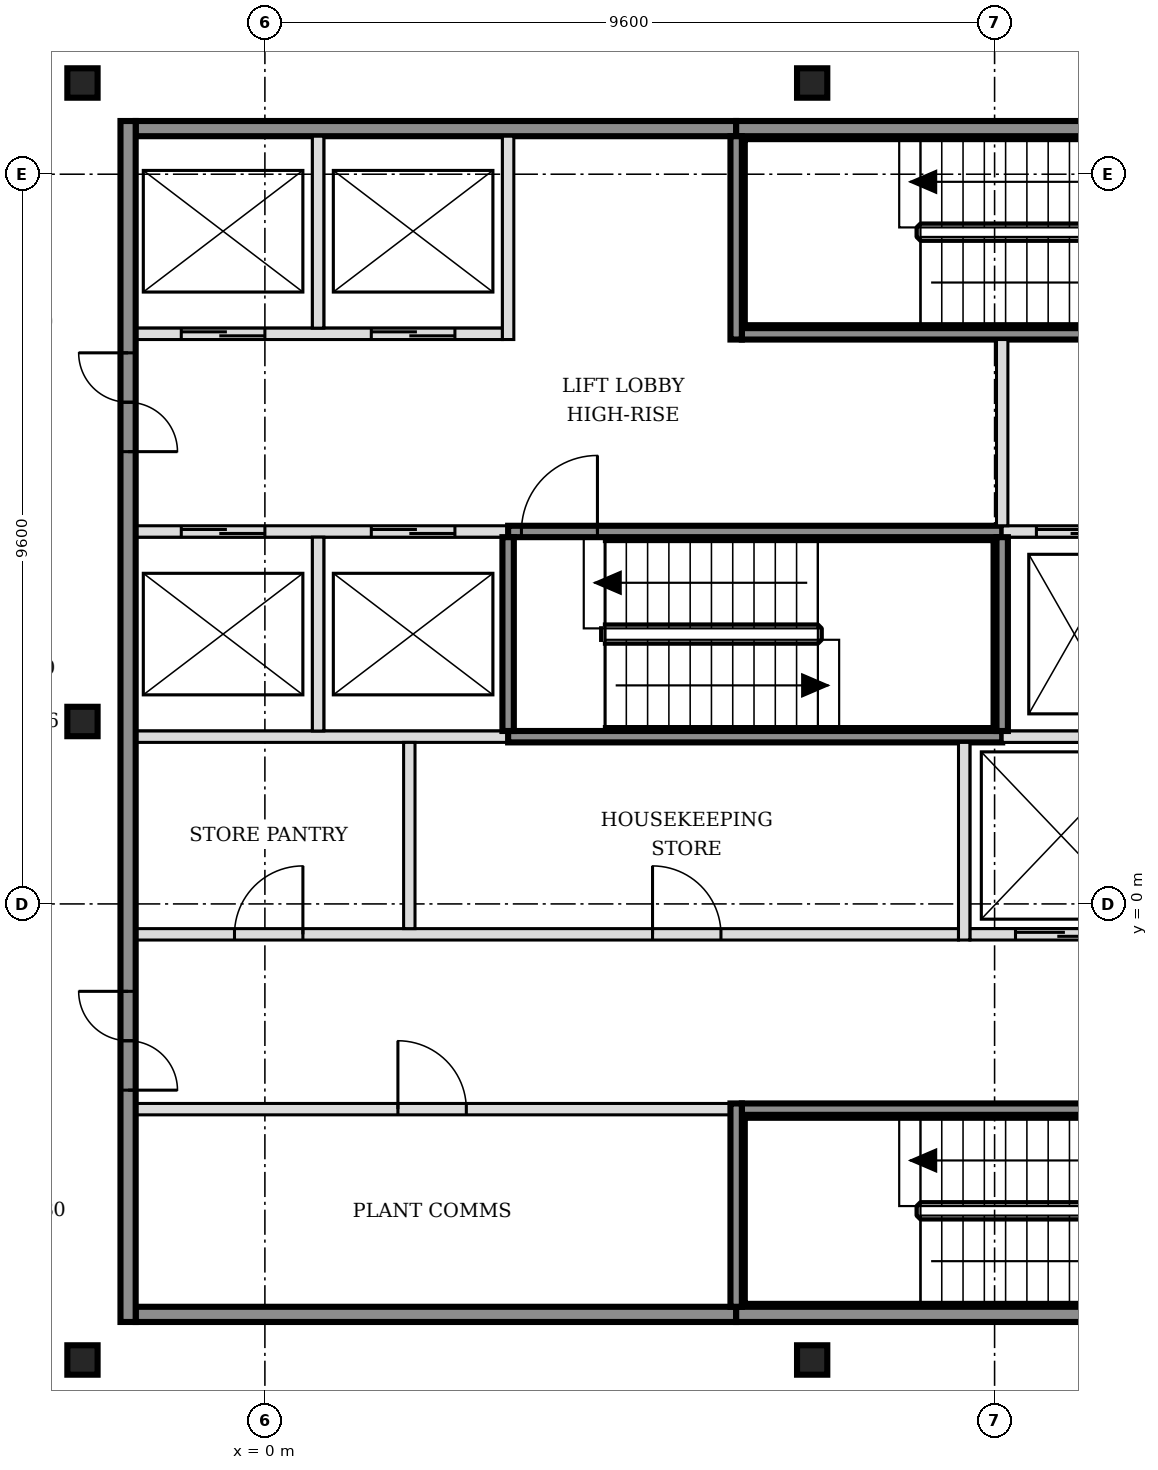
"""IFC4 building model, lengths in metres.
Left out: names, types, materials, properties, quantities, classifications, styles, units other than length and angle.
Written with IfcOpenShell. Run it as: python <this file> out.ifc"""

import sys

from ifc_helpers import new_model, si_unit, direction, frame, frame_2d, origin, origin_2d, place, context, subcontext, project, spatial, rectangle, i_section, extrude, element, fill, save


model = new_model("IFC4")
c1 = context("Model", 3, precision=1e-05, world=origin(), true_north=direction((0.0, 1.0)))
c2 = subcontext(c1, "Body", "Model", "MODEL_VIEW")
j1 = project(units=[si_unit("LENGTHUNIT", "METRE"), si_unit("PLANEANGLEUNIT", "RADIAN")], contexts=[c1])
p1 = place(None, origin())
s1 = spatial("IfcSite", under=j1, at=p1, CompositionType="ELEMENT")
p2 = place(p1, origin())
s2 = spatial("IfcBuilding", under=s1, at=p2, CompositionType="ELEMENT")
p3 = place(p2, frame((0.0, 0.0, 243.0)))
s3 = spatial("IfcBuildingStorey", under=s2, at=p3, CompositionType="ELEMENT", Elevation=243.0)
for number, where, z_axis, x_axis in (
    (1, (-2.4, -6.0, -0.15), (0.0, 0.0, 1.0), (1.0, 0.0, 0.0)),
    (2, (7.2, -6.0, -0.15), (0.0, 0.0, 1.0), (1.0, 0.0, 0.0)),
    (3, (-2.4, 2.4, -0.15), (0.0, 0.0, 1.0), (1.0, 0.0, 0.0)),
    (4, (-2.4, 10.8, -0.15), (0.0, 0.0, 1.0), (1.0, 0.0, 0.0)),
    (5, (7.2, 10.8, -0.15), (0.0, 0.0, 1.0), (1.0, 0.0, 0.0)),
):
    element("IfcColumn", number, at=place(p3, frame(where, z_axis=z_axis, x_axis=x_axis)), inside=s3, PredefinedType="COLUMN", context=c2, shape_type="SweptSolid", body=[
        extrude(i_section(OverallWidth=0.398, OverallDepth=0.387, WebThickness=0.021, FlangeThickness=0.033, FilletRadius=0.015, at=origin_2d()), origin(), (0.0, 0.0, 1.0), 3.6),
    ])
p4 = place(p3, frame((-1.7, -5.4, 0.0), z_axis=(0.0, 0.0, 1.0), x_axis=(1.0, 0.0, 0.0)))
e6 = element("IfcWall", 6, at=p4, inside=s3, PredefinedType="SOLIDWALL", context=c2, shape_type="SweptSolid", body=[
    extrude(rectangle(XDim=7.9, YDim=0.2, at=frame_2d((3.95, 0.0))), origin(), (0.0, 0.0, 1.0), 3.45),
])
p5 = place(p3, frame((6.2, -5.4, 0.0), z_axis=(0.0, 0.0, 1.0), x_axis=(1.0, 0.0, 0.0)))
e7 = element("IfcWall", 7, at=p5, inside=s3, PredefinedType="SOLIDWALL", context=c2, shape_type="SweptSolid", body=[
    extrude(rectangle(XDim=6.5, YDim=0.2, at=frame_2d((3.25, 0.0))), origin(), (0.0, 0.0, 1.0), 3.45),
])
p6 = place(p3, frame((-1.7, -2.7, 0.0), z_axis=(0.0, 0.0, 1.0), x_axis=(1.0, 0.0, 0.0)))
e8 = element("IfcWall", 8, at=p6, inside=s3, PredefinedType="PARTITIONING", context=c2, shape_type="SweptSolid", body=[
    extrude(rectangle(XDim=7.825, YDim=0.15, at=frame_2d((3.913, 0.0))), origin(), (0.0, 0.0, 1.0), 3.45),
])
p7 = place(p6, frame((3.45, 0.0, 0.0)))
e9 = element("IfcOpeningElement", 9, at=p7, cuts=e8, PredefinedType="OPENING", context=c2, shape_type="SweptSolid", body=[
    extrude(rectangle(XDim=0.9, YDim=2.1, at=frame_2d((0.45, 1.05))), frame((0.0, 0.085, 0.0), z_axis=(0.0, -1.0, 0.0), x_axis=(1.0, 0.0, 0.0)), (0.0, 0.0, 1.0), 0.17),
])
p8 = place(p3, frame((6.275, -2.7, 0.0), z_axis=(0.0, 0.0, 1.0), x_axis=(1.0, 0.0, 0.0)))
e10 = element("IfcWall", 10, at=p8, inside=s3, PredefinedType="SOLIDWALL", context=c2, shape_type="SweptSolid", body=[
    extrude(rectangle(XDim=6.35, YDim=0.15, at=frame_2d((3.175, 0.0))), origin(), (0.0, 0.0, 1.0), 3.45),
])
p9 = place(p8, frame((5.225, 0.0, 0.0)))
e11 = element("IfcOpeningElement", 11, at=p9, cuts=e10, PredefinedType="OPENING", context=c2, shape_type="SweptSolid", body=[
    extrude(rectangle(XDim=1.0, YDim=2.1, at=frame_2d((0.5, 1.05))), frame((0.0, 0.085, 0.0), z_axis=(0.0, -1.0, 0.0), x_axis=(1.0, 0.0, 0.0)), (0.0, 0.0, 1.0), 0.17),
])
p10 = place(p3, frame((-1.7, -0.4, 0.0), z_axis=(0.0, 0.0, 1.0), x_axis=(1.0, 0.0, 0.0)))
e12 = element("IfcWall", 12, at=p10, inside=s3, PredefinedType="PARTITIONING", context=c2, shape_type="SweptSolid", body=[
    extrude(rectangle(XDim=10.825, YDim=0.15, at=frame_2d((5.413, 0.0))), origin(), (0.0, 0.0, 1.0), 3.45),
])
p11 = place(p10, frame((1.3, 0.0, 0.0)))
e13 = element("IfcOpeningElement", 13, at=p11, cuts=e12, PredefinedType="OPENING", context=c2, shape_type="SweptSolid", body=[
    extrude(rectangle(XDim=0.9, YDim=2.1, at=frame_2d((0.45, 1.05))), frame((0.0, 0.085, 0.0), z_axis=(0.0, -1.0, 0.0), x_axis=(1.0, 0.0, 0.0)), (0.0, 0.0, 1.0), 0.17),
])
p12 = place(p10, frame((6.8, 0.0, 0.0)))
e14 = element("IfcOpeningElement", 14, at=p12, cuts=e12, PredefinedType="OPENING", context=c2, shape_type="SweptSolid", body=[
    extrude(rectangle(XDim=0.9, YDim=2.1, at=frame_2d((0.45, 1.05))), frame((0.0, 0.085, 0.0), z_axis=(0.0, -1.0, 0.0), x_axis=(1.0, 0.0, 0.0)), (0.0, 0.0, 1.0), 0.17),
])
p13 = place(p3, frame((9.275, -0.4, 0.0), z_axis=(0.0, 0.0, 1.0), x_axis=(1.0, 0.0, 0.0)))
e15 = element("IfcWall", 15, at=p13, inside=s3, PredefinedType="SOLIDWALL", context=c2, shape_type="SweptSolid", body=[
    extrude(rectangle(XDim=4.95, YDim=0.15, at=frame_2d((2.475, 0.0))), origin(), (0.0, 0.0, 1.0), 3.45),
])
p14 = place(p13, frame((0.6, 0.0, 0.0)))
e16 = element("IfcOpeningElement", 16, at=p14, cuts=e15, PredefinedType="OPENING", context=c2, shape_type="SweptSolid", body=[
    extrude(rectangle(XDim=1.2, YDim=2.1, at=frame_2d((0.6, 1.05))), frame((0.0, 0.085, 0.0), z_axis=(0.0, -1.0, 0.0), x_axis=(1.0, 0.0, 0.0)), (0.0, 0.0, 1.0), 0.17),
])
p15 = place(p13, frame((3.15, 0.0, 0.0)))
e17 = element("IfcOpeningElement", 17, at=p15, cuts=e15, PredefinedType="OPENING", context=c2, shape_type="SweptSolid", body=[
    extrude(rectangle(XDim=1.2, YDim=2.1, at=frame_2d((0.6, 1.05))), frame((0.0, 0.085, 0.0), z_axis=(0.0, -1.0, 0.0), x_axis=(1.0, 0.0, 0.0)), (0.0, 0.0, 1.0), 0.17),
])
p16 = place(p3, frame((-1.7, 2.2, 0.0), z_axis=(0.0, 0.0, 1.0), x_axis=(1.0, 0.0, 0.0)))
e18 = element("IfcWall", 18, at=p16, inside=s3, PredefinedType="SOLIDWALL", context=c2, shape_type="SweptSolid", body=[
    extrude(rectangle(XDim=4.9, YDim=0.15, at=frame_2d((2.45, 0.0))), origin(), (0.0, 0.0, 1.0), 3.45),
])
p17 = place(p3, frame((3.2, 2.2, 0.0), z_axis=(0.0, 0.0, 1.0), x_axis=(1.0, 0.0, 0.0)))
e19 = element("IfcWall", 19, at=p17, inside=s3, PredefinedType="SOLIDWALL", context=c2, shape_type="SweptSolid", body=[
    extrude(rectangle(XDim=6.5, YDim=0.15, at=frame_2d((3.25, 0.0))), origin(), (0.0, 0.0, 1.0), 3.45),
])
p18 = place(p3, frame((9.7, 2.2, 0.0), z_axis=(0.0, 0.0, 1.0), x_axis=(1.0, 0.0, 0.0)))
e20 = element("IfcWall", 20, at=p18, inside=s3, PredefinedType="SOLIDWALL", context=c2, shape_type="SweptSolid", body=[
    extrude(rectangle(XDim=4.525, YDim=0.15, at=frame_2d((2.263, 0.0))), origin(), (0.0, 0.0, 1.0), 3.45),
])
p19 = place(p3, frame((-1.7, 4.9, 0.0), z_axis=(0.0, 0.0, 1.0), x_axis=(1.0, 0.0, 0.0)))
e21 = element("IfcWall", 21, at=p19, inside=s3, PredefinedType="SOLIDWALL", context=c2, shape_type="SweptSolid", body=[
    extrude(rectangle(XDim=4.9, YDim=0.15, at=frame_2d((2.45, 0.0))), origin(), (0.0, 0.0, 1.0), 3.45),
])
p20 = place(p19, frame((0.6, 0.0, 0.0)))
e22 = element("IfcOpeningElement", 22, at=p20, cuts=e21, PredefinedType="OPENING", context=c2, shape_type="SweptSolid", body=[
    extrude(rectangle(XDim=1.1, YDim=2.1, at=frame_2d((0.55, 1.05))), frame((0.0, 0.085, 0.0), z_axis=(0.0, -1.0, 0.0), x_axis=(1.0, 0.0, 0.0)), (0.0, 0.0, 1.0), 0.17),
])
p21 = place(p19, frame((3.1, 0.0, 0.0)))
e23 = element("IfcOpeningElement", 23, at=p21, cuts=e21, PredefinedType="OPENING", context=c2, shape_type="SweptSolid", body=[
    extrude(rectangle(XDim=1.1, YDim=2.1, at=frame_2d((0.55, 1.05))), frame((0.0, 0.085, 0.0), z_axis=(0.0, -1.0, 0.0), x_axis=(1.0, 0.0, 0.0)), (0.0, 0.0, 1.0), 0.17),
])
p22 = place(p3, frame((3.2, 4.9, 0.0), z_axis=(0.0, 0.0, 1.0), x_axis=(1.0, 0.0, 0.0)))
e24 = element("IfcWall", 24, at=p22, inside=s3, PredefinedType="SOLIDWALL", context=c2, shape_type="SweptSolid", body=[
    extrude(rectangle(XDim=6.5, YDim=0.15, at=frame_2d((3.25, 0.0))), origin(), (0.0, 0.0, 1.0), 3.45),
])
p23 = place(p22, frame((0.175, 0.0, 0.0)))
e25 = element("IfcOpeningElement", 25, at=p23, cuts=e24, PredefinedType="OPENING", context=c2, shape_type="SweptSolid", body=[
    extrude(rectangle(XDim=1.0, YDim=2.1, at=frame_2d((0.5, 1.05))), frame((0.0, 0.085, 0.0), z_axis=(0.0, -1.0, 0.0), x_axis=(1.0, 0.0, 0.0)), (0.0, 0.0, 1.0), 0.17),
])
p24 = place(p3, frame((9.7, 4.9, 0.0), z_axis=(0.0, 0.0, 1.0), x_axis=(1.0, 0.0, 0.0)))
e26 = element("IfcWall", 26, at=p24, inside=s3, PredefinedType="SOLIDWALL", context=c2, shape_type="SweptSolid", body=[
    extrude(rectangle(XDim=6.4, YDim=0.15, at=frame_2d((3.2, 0.0))), origin(), (0.0, 0.0, 1.0), 3.45),
])
p25 = place(p24, frame((0.45, 0.0, 0.0)))
e27 = element("IfcOpeningElement", 27, at=p25, cuts=e26, PredefinedType="OPENING", context=c2, shape_type="SweptSolid", body=[
    extrude(rectangle(XDim=1.0, YDim=2.1, at=frame_2d((0.5, 1.05))), frame((0.0, 0.085, 0.0), z_axis=(0.0, -1.0, 0.0), x_axis=(1.0, 0.0, 0.0)), (0.0, 0.0, 1.0), 0.17),
])
p26 = place(p24, frame((2.35, 0.0, 0.0)))
e28 = element("IfcOpeningElement", 28, at=p26, cuts=e26, PredefinedType="OPENING", context=c2, shape_type="SweptSolid", body=[
    extrude(rectangle(XDim=1.0, YDim=2.1, at=frame_2d((0.5, 1.05))), frame((0.0, 0.085, 0.0), z_axis=(0.0, -1.0, 0.0), x_axis=(1.0, 0.0, 0.0)), (0.0, 0.0, 1.0), 0.17),
])
p27 = place(p24, frame((4.7, 0.0, 0.0)))
e29 = element("IfcOpeningElement", 29, at=p27, cuts=e26, PredefinedType="OPENING", context=c2, shape_type="SweptSolid", body=[
    extrude(rectangle(XDim=0.9, YDim=2.1, at=frame_2d((0.45, 1.05))), frame((0.0, 0.085, 0.0), z_axis=(0.0, -1.0, 0.0), x_axis=(1.0, 0.0, 0.0)), (0.0, 0.0, 1.0), 0.17),
])
p28 = place(p3, frame((-1.7, 7.5, 0.0), z_axis=(0.0, 0.0, 1.0), x_axis=(1.0, 0.0, 0.0)))
e30 = element("IfcWall", 30, at=p28, inside=s3, PredefinedType="SOLIDWALL", context=c2, shape_type="SweptSolid", body=[
    extrude(rectangle(XDim=4.825, YDim=0.15, at=frame_2d((2.413, 0.0))), origin(), (0.0, 0.0, 1.0), 3.45),
])
p29 = place(p28, frame((0.6, 0.0, 0.0)))
e31 = element("IfcOpeningElement", 31, at=p29, cuts=e30, PredefinedType="OPENING", context=c2, shape_type="SweptSolid", body=[
    extrude(rectangle(XDim=1.1, YDim=2.1, at=frame_2d((0.55, 1.05))), frame((0.0, 0.085, 0.0), z_axis=(0.0, -1.0, 0.0), x_axis=(1.0, 0.0, 0.0)), (0.0, 0.0, 1.0), 0.17),
])
p30 = place(p28, frame((3.1, 0.0, 0.0)))
e32 = element("IfcOpeningElement", 32, at=p30, cuts=e30, PredefinedType="OPENING", context=c2, shape_type="SweptSolid", body=[
    extrude(rectangle(XDim=1.1, YDim=2.1, at=frame_2d((0.55, 1.05))), frame((0.0, 0.085, 0.0), z_axis=(0.0, -1.0, 0.0), x_axis=(1.0, 0.0, 0.0)), (0.0, 0.0, 1.0), 0.17),
])
p31 = place(p3, frame((6.275, 7.5, 0.0), z_axis=(0.0, 0.0, 1.0), x_axis=(1.0, 0.0, 0.0)))
e33 = element("IfcWall", 33, at=p31, inside=s3, PredefinedType="SOLIDWALL", context=c2, shape_type="SweptSolid", body=[
    extrude(rectangle(XDim=6.425, YDim=0.15, at=frame_2d((3.212, 0.0))), origin(), (0.0, 0.0, 1.0), 3.45),
])
p32 = place(p31, frame((5.225, 0.0, 0.0)))
e34 = element("IfcOpeningElement", 34, at=p32, cuts=e33, PredefinedType="OPENING", context=c2, shape_type="SweptSolid", body=[
    extrude(rectangle(XDim=1.0, YDim=2.1, at=frame_2d((0.5, 1.05))), frame((0.0, 0.085, 0.0), z_axis=(0.0, -1.0, 0.0), x_axis=(1.0, 0.0, 0.0)), (0.0, 0.0, 1.0), 0.17),
])
p33 = place(p3, frame((-1.7, 10.2, 0.0), z_axis=(0.0, 0.0, 1.0), x_axis=(1.0, 0.0, 0.0)))
e35 = element("IfcWall", 35, at=p33, inside=s3, PredefinedType="SOLIDWALL", context=c2, shape_type="SweptSolid", body=[
    extrude(rectangle(XDim=7.9, YDim=0.2, at=frame_2d((3.95, 0.0))), origin(), (0.0, 0.0, 1.0), 3.45),
])
p34 = place(p3, frame((6.2, 10.2, 0.0), z_axis=(0.0, 0.0, 1.0), x_axis=(1.0, 0.0, 0.0)))
e36 = element("IfcWall", 36, at=p34, inside=s3, PredefinedType="SOLIDWALL", context=c2, shape_type="SweptSolid", body=[
    extrude(rectangle(XDim=6.5, YDim=0.2, at=frame_2d((3.25, 0.0))), origin(), (0.0, 0.0, 1.0), 3.45),
])
p35 = place(p3, frame((-1.8, -5.5, 0.0), z_axis=(0.0, 0.0, 1.0), x_axis=(0.0, 1.0, 0.0)))
e37 = element("IfcWall", 37, at=p35, inside=s3, PredefinedType="SOLIDWALL", context=c2, shape_type="SweptSolid", body=[
    extrude(rectangle(XDim=15.8, YDim=0.2, at=frame_2d((7.9, 0.0))), origin(), (0.0, 0.0, 1.0), 3.45),
])
p36 = place(p35, frame((3.05, 0.0, 0.0)))
e38 = element("IfcOpeningElement", 38, at=p36, cuts=e37, PredefinedType="OPENING", context=c2, shape_type="SweptSolid", body=[
    extrude(rectangle(XDim=1.3, YDim=2.1, at=frame_2d((0.65, 1.05))), frame((0.0, 0.11, 0.0), z_axis=(0.0, -1.0, 0.0), x_axis=(1.0, 0.0, 0.0)), (0.0, 0.0, 1.0), 0.22),
])
p37 = place(p35, frame((11.45, 0.0, 0.0)))
e39 = element("IfcOpeningElement", 39, at=p37, cuts=e37, PredefinedType="OPENING", context=c2, shape_type="SweptSolid", body=[
    extrude(rectangle(XDim=1.3, YDim=2.1, at=frame_2d((0.65, 1.05))), frame((0.0, 0.11, 0.0), z_axis=(0.0, -1.0, 0.0), x_axis=(1.0, 0.0, 0.0)), (0.0, 0.0, 1.0), 0.22),
])
p38 = place(p3, frame((0.7, 2.275, 0.0), z_axis=(0.0, 0.0, 1.0), x_axis=(0.0, 1.0, 0.0)))
e40 = element("IfcWall", 40, at=p38, inside=s3, PredefinedType="SOLIDWALL", context=c2, shape_type="SweptSolid", body=[
    extrude(rectangle(XDim=2.55, YDim=0.15, at=frame_2d((1.275, 0.0))), origin(), (0.0, 0.0, 1.0), 3.45),
])
p39 = place(p3, frame((0.7, 7.575, 0.0), z_axis=(0.0, 0.0, 1.0), x_axis=(0.0, 1.0, 0.0)))
e41 = element("IfcWall", 41, at=p39, inside=s3, PredefinedType="SOLIDWALL", context=c2, shape_type="SweptSolid", body=[
    extrude(rectangle(XDim=2.525, YDim=0.15, at=frame_2d((1.263, 0.0))), origin(), (0.0, 0.0, 1.0), 3.45),
])
p40 = place(p3, frame((1.9, -0.325, 0.0), z_axis=(0.0, 0.0, 1.0), x_axis=(0.0, 1.0, 0.0)))
e42 = element("IfcWall", 42, at=p40, inside=s3, PredefinedType="PARTITIONING", context=c2, shape_type="SweptSolid", body=[
    extrude(rectangle(XDim=2.45, YDim=0.15, at=frame_2d((1.225, 0.0))), origin(), (0.0, 0.0, 1.0), 3.45),
])
p41 = place(p3, frame((3.2, 2.275, 0.0), z_axis=(0.0, 0.0, 1.0), x_axis=(0.0, 1.0, 0.0)))
e43 = element("IfcWall", 43, at=p41, inside=s3, PredefinedType="SOLIDWALL", context=c2, shape_type="SweptSolid", body=[
    extrude(rectangle(XDim=2.55, YDim=0.15, at=frame_2d((1.275, 0.0))), origin(), (0.0, 0.0, 1.0), 3.45),
])
for number, where, z_axis, x_axis in (
    (44, (3.2, 7.425, 0.0), (0.0, 0.0, 1.0), (0.0, 1.0, 0.0)),
    (45, (6.2, -5.3, 0.0), (0.0, 0.0, 1.0), (0.0, 1.0, 0.0)),
    (46, (6.2, 7.425, 0.0), (0.0, 0.0, 1.0), (0.0, 1.0, 0.0)),
):
    element("IfcWall", number, at=place(p3, frame(where, z_axis=z_axis, x_axis=x_axis)), inside=s3, PredefinedType="SOLIDWALL", context=c2, shape_type="SweptSolid", body=[
        extrude(rectangle(XDim=2.675, YDim=0.15, at=frame_2d((1.337, 0.0))), origin(), (0.0, 0.0, 1.0), 3.45),
    ])
p42 = place(p3, frame((9.2, -0.475, 0.0), z_axis=(0.0, 0.0, 1.0), x_axis=(0.0, 1.0, 0.0)))
e47 = element("IfcWall", 47, at=p42, inside=s3, PredefinedType="SOLIDWALL", context=c2, shape_type="SweptSolid", body=[
    extrude(rectangle(XDim=2.6, YDim=0.15, at=frame_2d((1.3, 0.0))), origin(), (0.0, 0.0, 1.0), 3.45),
])
p43 = place(p3, frame((9.7, 2.275, 0.0), z_axis=(0.0, 0.0, 1.0), x_axis=(0.0, 1.0, 0.0)))
e48 = element("IfcWall", 48, at=p43, inside=s3, PredefinedType="SOLIDWALL", context=c2, shape_type="SweptSolid", body=[
    extrude(rectangle(XDim=2.55, YDim=0.15, at=frame_2d((1.275, 0.0))), origin(), (0.0, 0.0, 1.0), 3.45),
])
p44 = place(p3, frame((9.7, 4.975, 0.0), z_axis=(0.0, 0.0, 1.0), x_axis=(0.0, 1.0, 0.0)))
e49 = element("IfcWall", 49, at=p44, inside=s3, PredefinedType="SOLIDWALL", context=c2, shape_type="SweptSolid", body=[
    extrude(rectangle(XDim=2.45, YDim=0.15, at=frame_2d((1.225, 0.0))), origin(), (0.0, 0.0, 1.0), 3.45),
])
p45 = place(p14, origin())
e50 = element("IfcDoor", 50, at=p45, inside=s3, OperationType="DOUBLE_DOOR_SLIDING", PredefinedType="DOOR", context=c2, shape_type="SweptSolid", body=[
    extrude(rectangle(XDim=1.2, YDim=2.1, at=frame_2d((0.6, 1.05))), frame((0.0, 0.025, 0.0), z_axis=(0.0, -1.0, 0.0), x_axis=(1.0, 0.0, 0.0)), (0.0, 0.0, 1.0), 0.05),
])
fill(e16, e50)
p46 = place(p20, origin())
e51 = element("IfcDoor", 51, at=p46, inside=s3, OperationType="DOUBLE_DOOR_SLIDING", PredefinedType="DOOR", context=c2, shape_type="SweptSolid", body=[
    extrude(rectangle(XDim=1.1, YDim=2.1, at=frame_2d((0.55, 1.05))), frame((0.0, 0.025, 0.0), z_axis=(0.0, -1.0, 0.0), x_axis=(1.0, 0.0, 0.0)), (0.0, 0.0, 1.0), 0.05),
])
fill(e22, e51)
p47 = place(p21, origin())
e52 = element("IfcDoor", 52, at=p47, inside=s3, OperationType="DOUBLE_DOOR_SLIDING", PredefinedType="DOOR", context=c2, shape_type="SweptSolid", body=[
    extrude(rectangle(XDim=1.1, YDim=2.1, at=frame_2d((0.55, 1.05))), frame((0.0, 0.025, 0.0), z_axis=(0.0, -1.0, 0.0), x_axis=(1.0, 0.0, 0.0)), (0.0, 0.0, 1.0), 0.05),
])
fill(e23, e52)
p48 = place(p29, origin())
e53 = element("IfcDoor", 53, at=p48, inside=s3, OperationType="DOUBLE_DOOR_SLIDING", PredefinedType="DOOR", context=c2, shape_type="SweptSolid", body=[
    extrude(rectangle(XDim=1.1, YDim=2.1, at=frame_2d((0.55, 1.05))), frame((0.0, 0.025, 0.0), z_axis=(0.0, -1.0, 0.0), x_axis=(1.0, 0.0, 0.0)), (0.0, 0.0, 1.0), 0.05),
])
fill(e31, e53)
p49 = place(p30, origin())
e54 = element("IfcDoor", 54, at=p49, inside=s3, OperationType="DOUBLE_DOOR_SLIDING", PredefinedType="DOOR", context=c2, shape_type="SweptSolid", body=[
    extrude(rectangle(XDim=1.1, YDim=2.1, at=frame_2d((0.55, 1.05))), frame((0.0, 0.025, 0.0), z_axis=(0.0, -1.0, 0.0), x_axis=(1.0, 0.0, 0.0)), (0.0, 0.0, 1.0), 0.05),
])
fill(e32, e54)
p50 = place(p25, origin())
e55 = element("IfcDoor", 55, at=p50, inside=s3, OperationType="DOUBLE_DOOR_SLIDING", PredefinedType="DOOR", context=c2, shape_type="SweptSolid", body=[
    extrude(rectangle(XDim=1.0, YDim=2.1, at=frame_2d((0.5, 1.05))), frame((0.0, 0.025, 0.0), z_axis=(0.0, -1.0, 0.0), x_axis=(1.0, 0.0, 0.0)), (0.0, 0.0, 1.0), 0.05),
])
fill(e27, e55)
p51 = place(p23, origin())
e56 = element("IfcDoor", 56, at=p51, inside=s3, OperationType="SINGLE_SWING_RIGHT", PredefinedType="DOOR", context=c2, shape_type="SweptSolid", body=[
    extrude(rectangle(XDim=1.0, YDim=2.1, at=frame_2d((0.5, 1.05))), frame((0.0, 0.025, 0.0), z_axis=(0.0, -1.0, 0.0), x_axis=(1.0, 0.0, 0.0)), (0.0, 0.0, 1.0), 0.05),
])
fill(e25, e56)
p52 = place(p36, origin())
e57 = element("IfcDoor", 57, at=p52, inside=s3, OperationType="DOUBLE_DOOR_SINGLE_SWING", PredefinedType="DOOR", context=c2, shape_type="SweptSolid", body=[
    extrude(rectangle(XDim=1.3, YDim=2.1, at=frame_2d((0.65, 1.05))), frame((0.0, 0.025, 0.0), z_axis=(0.0, -1.0, 0.0), x_axis=(1.0, 0.0, 0.0)), (0.0, 0.0, 1.0), 0.05),
])
fill(e38, e57)
p53 = place(p37, origin())
e58 = element("IfcDoor", 58, at=p53, inside=s3, OperationType="DOUBLE_DOOR_SINGLE_SWING", PredefinedType="DOOR", context=c2, shape_type="SweptSolid", body=[
    extrude(rectangle(XDim=1.3, YDim=2.1, at=frame_2d((0.65, 1.05))), frame((0.0, 0.025, 0.0), z_axis=(0.0, -1.0, 0.0), x_axis=(1.0, 0.0, 0.0)), (0.0, 0.0, 1.0), 0.05),
])
fill(e39, e58)
p54 = place(p7, origin())
e59 = element("IfcDoor", 59, at=p54, inside=s3, OperationType="SINGLE_SWING_LEFT", PredefinedType="DOOR", context=c2, shape_type="SweptSolid", body=[
    extrude(rectangle(XDim=0.9, YDim=2.1, at=frame_2d((0.45, 1.05))), frame((0.0, 0.025, 0.0), z_axis=(0.0, -1.0, 0.0), x_axis=(1.0, 0.0, 0.0)), (0.0, 0.0, 1.0), 0.05),
])
fill(e9, e59)
p55 = place(p11, origin())
e60 = element("IfcDoor", 60, at=p55, inside=s3, OperationType="SINGLE_SWING_RIGHT", PredefinedType="DOOR", context=c2, shape_type="SweptSolid", body=[
    extrude(rectangle(XDim=0.9, YDim=2.1, at=frame_2d((0.45, 1.05))), frame((0.0, 0.025, 0.0), z_axis=(0.0, -1.0, 0.0), x_axis=(1.0, 0.0, 0.0)), (0.0, 0.0, 1.0), 0.05),
])
fill(e13, e60)
p56 = place(p12, origin())
e61 = element("IfcDoor", 61, at=p56, inside=s3, OperationType="SINGLE_SWING_LEFT", PredefinedType="DOOR", context=c2, shape_type="SweptSolid", body=[
    extrude(rectangle(XDim=0.9, YDim=2.1, at=frame_2d((0.45, 1.05))), frame((0.0, 0.025, 0.0), z_axis=(0.0, -1.0, 0.0), x_axis=(1.0, 0.0, 0.0)), (0.0, 0.0, 1.0), 0.05),
])
fill(e14, e61)
save(model, sys.argv[1])
